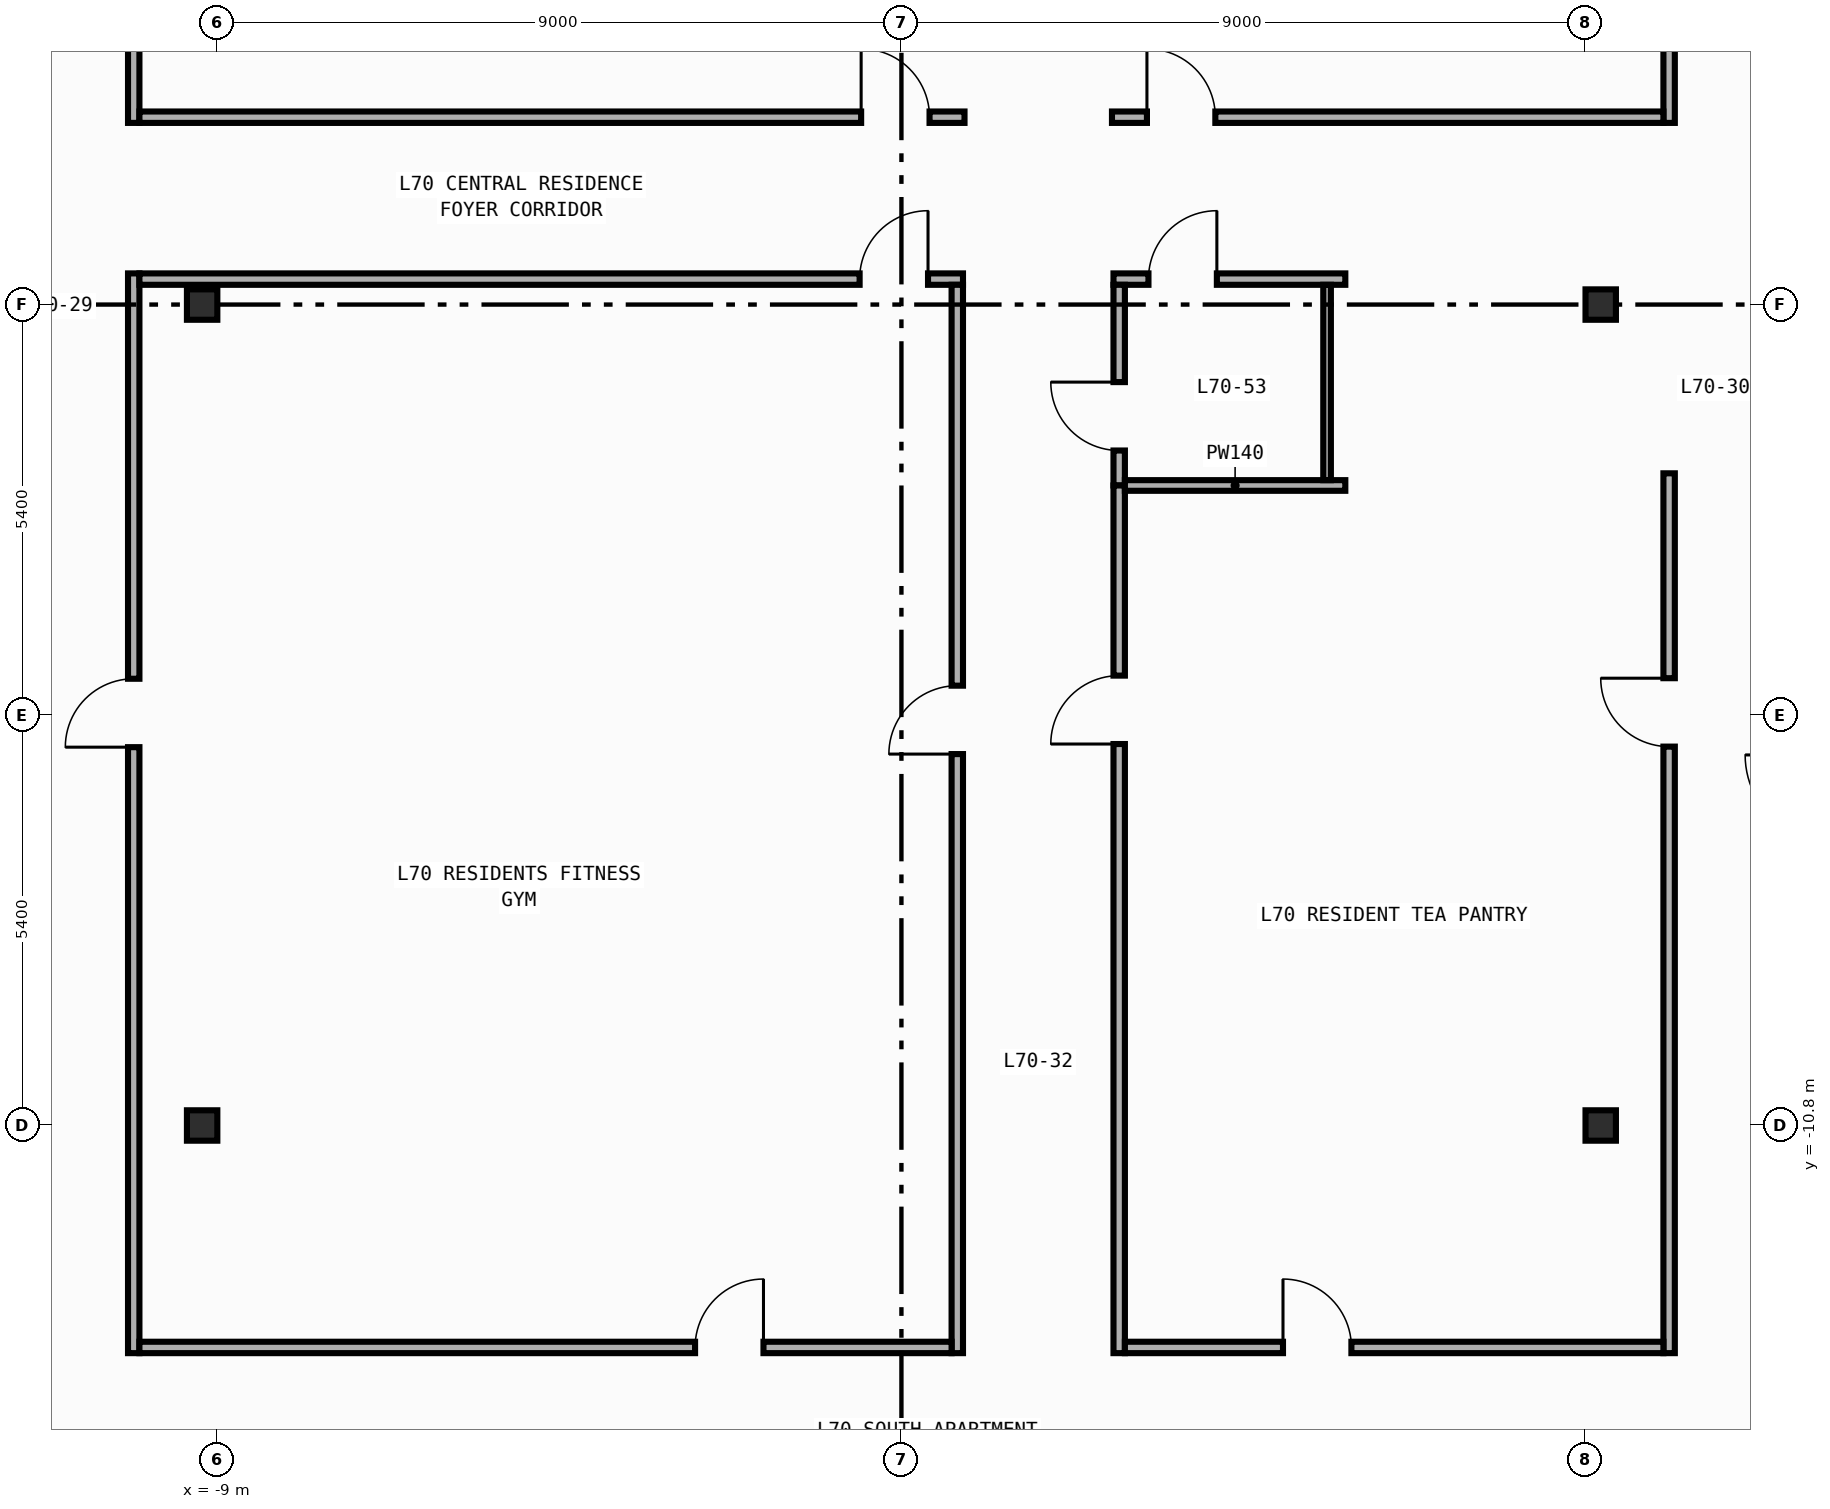
"""IFC4 building model, lengths in metres.
Left out: names, types, materials, properties, quantities, classifications, styles, units other than length and angle.
Written with IfcOpenShell. Run it as: python <this file> out.ifc"""

import sys

from ifc_helpers import new_model, si_unit, direction, frame, frame_2d, origin, origin_2d, place, context, subcontext, project, spatial, rectangle, i_section, extrude, element, fill, save


model = new_model("IFC4")
c1 = context("Model", 3, precision=1e-05, world=origin(), true_north=direction((0.0, 1.0)))
c2 = subcontext(c1, "Body", "Model", "MODEL_VIEW")
j1 = project(units=[si_unit("LENGTHUNIT", "METRE"), si_unit("PLANEANGLEUNIT", "RADIAN")], contexts=[c1])
p1 = place(None, origin())
s1 = spatial("IfcSite", under=j1, at=p1, CompositionType="ELEMENT")
p2 = place(p1, origin())
s2 = spatial("IfcBuilding", under=s1, at=p2, CompositionType="ELEMENT")
p3 = place(p2, frame((0.0, 0.0, 292.8)))
s3 = spatial("IfcBuildingStorey", under=s2, at=p3, CompositionType="ELEMENT", Elevation=292.8)
for number, where, z_axis, x_axis in (
    (1, (-9.2, -10.8, 0.0), (0.0, 0.0, 1.0), (1.0, 0.0, 0.0)),
    (2, (-9.2, 0.0, 0.0), (0.0, 0.0, 1.0), (1.0, 0.0, 0.0)),
    (3, (9.2, -10.8, 0.0), (0.0, 0.0, 1.0), (1.0, 0.0, 0.0)),
    (4, (9.2, 0.0, 0.0), (0.0, 0.0, 1.0), (1.0, 0.0, 0.0)),
):
    element("IfcColumn", number, at=place(p3, frame(where, z_axis=z_axis, x_axis=x_axis)), inside=s3, PredefinedType="COLUMN", context=c2, shape_type="SweptSolid", body=[
        extrude(i_section(OverallWidth=0.4, OverallDepth=0.4, WebThickness=0.013, FlangeThickness=0.021, FilletRadius=0.022, at=origin_2d()), origin(), (0.0, 0.0, 1.0), 3.8),
    ])
p4 = place(p3, frame((-10.1, 2.39, 0.0), z_axis=(0.0, 0.0, 1.0), x_axis=(0.0, 1.0, 0.0)))
e5 = element("IfcWall", 5, at=p4, inside=s3, PredefinedType="PARTITIONING", context=c2, shape_type="SweptSolid", body=[
    extrude(rectangle(XDim=11.405, YDim=0.15, at=frame_2d((5.703, 0.0))), origin(), (0.0, 0.0, 1.0), 3.54),
])
p5 = place(p4, frame((2.5, 0.0, 0.0)))
e6 = element("IfcOpeningElement", 6, at=p5, cuts=e5, PredefinedType="OPENING", context=c2, shape_type="SweptSolid", body=[
    extrude(rectangle(XDim=0.9, YDim=2.15, at=frame_2d((0.45, 1.075))), frame((0.0, 0.085, 0.0), z_axis=(0.0, -1.0, 0.0), x_axis=(1.0, 0.0, 0.0)), (0.0, 0.0, 1.0), 0.17),
])
p6 = place(p3, frame((-10.1, -13.795, 0.0), z_axis=(0.0, 0.0, 1.0), x_axis=(0.0, 1.0, 0.0)))
e7 = element("IfcWall", 7, at=p6, inside=s3, PredefinedType="PARTITIONING", context=c2, shape_type="SweptSolid", body=[
    extrude(rectangle(XDim=14.205, YDim=0.15, at=frame_2d((7.103, 0.0))), origin(), (0.0, 0.0, 1.0), 3.54),
])
p7 = place(p6, frame((7.972, 0.0, 0.0)))
e8 = element("IfcOpeningElement", 8, at=p7, cuts=e7, PredefinedType="OPENING", context=c2, shape_type="SweptSolid", body=[
    extrude(rectangle(XDim=0.9, YDim=2.15, at=frame_2d((0.45, 1.075))), frame((0.0, 0.085, 0.0), z_axis=(0.0, -1.0, 0.0), x_axis=(1.0, 0.0, 0.0)), (0.0, 0.0, 1.0), 0.17),
])
p8 = place(p3, frame((10.1, 2.39, 0.0), z_axis=(0.0, 0.0, 1.0), x_axis=(0.0, 1.0, 0.0)))
e9 = element("IfcWall", 9, at=p8, inside=s3, PredefinedType="PARTITIONING", context=c2, shape_type="SweptSolid", body=[
    extrude(rectangle(XDim=11.49, YDim=0.15, at=frame_2d((5.745, 0.0))), origin(), (0.0, 0.0, 1.0), 3.54),
])
p9 = place(p8, frame((2.475, 0.0, 0.0)))
e10 = element("IfcOpeningElement", 10, at=p9, cuts=e9, PredefinedType="OPENING", context=c2, shape_type="SweptSolid", body=[
    extrude(rectangle(XDim=0.9, YDim=2.15, at=frame_2d((0.45, 1.075))), frame((0.0, 0.085, 0.0), z_axis=(0.0, -1.0, 0.0), x_axis=(1.0, 0.0, 0.0)), (0.0, 0.0, 1.0), 0.17),
])
p10 = place(p3, frame((10.1, -13.795, 0.0), z_axis=(0.0, 0.0, 1.0), x_axis=(0.0, 1.0, 0.0)))
e11 = element("IfcWall", 11, at=p10, inside=s3, PredefinedType="PARTITIONING", context=c2, shape_type="SweptSolid", body=[
    extrude(rectangle(XDim=11.575, YDim=0.15, at=frame_2d((5.788, 0.0))), origin(), (0.0, 0.0, 1.0), 3.54),
])
p11 = place(p10, frame((7.979, 0.0, 0.0)))
e12 = element("IfcOpeningElement", 12, at=p11, cuts=e11, PredefinedType="OPENING", context=c2, shape_type="SweptSolid", body=[
    extrude(rectangle(XDim=0.9, YDim=2.15, at=frame_2d((0.45, 1.075))), frame((0.0, 0.085, 0.0), z_axis=(0.0, -1.0, 0.0), x_axis=(1.0, 0.0, 0.0)), (0.0, 0.0, 1.0), 0.17),
])
p12 = place(p3, frame((-10.025, 2.465, 0.0), z_axis=(0.0, 0.0, 1.0), x_axis=(1.0, 0.0, 0.0)))
e13 = element("IfcWall", 13, at=p12, inside=s3, PredefinedType="PARTITIONING", context=c2, shape_type="SweptSolid", body=[
    extrude(rectangle(XDim=10.855, YDim=0.15, at=frame_2d((5.427, 0.0))), origin(), (0.0, 0.0, 1.0), 3.54),
])
p13 = place(p12, frame((9.495, 0.0, 0.0)))
e14 = element("IfcOpeningElement", 14, at=p13, cuts=e13, PredefinedType="OPENING", context=c2, shape_type="SweptSolid", body=[
    extrude(rectangle(XDim=0.9, YDim=2.15, at=frame_2d((0.45, 1.075))), frame((0.0, 0.085, 0.0), z_axis=(0.0, -1.0, 0.0), x_axis=(1.0, 0.0, 0.0)), (0.0, 0.0, 1.0), 0.17),
])
p14 = place(p3, frame((-10.025, 0.335, 0.0), z_axis=(0.0, 0.0, 1.0), x_axis=(1.0, 0.0, 0.0)))
e15 = element("IfcWall", 15, at=p14, inside=s3, PredefinedType="PARTITIONING", context=c2, shape_type="SweptSolid", body=[
    extrude(rectangle(XDim=10.835, YDim=0.15, at=frame_2d((5.417, 0.0))), origin(), (0.0, 0.0, 1.0), 2.64),
])
p15 = place(p14, frame((9.475, 0.0, 0.0)))
e16 = element("IfcOpeningElement", 16, at=p15, cuts=e15, PredefinedType="OPENING", context=c2, shape_type="SweptSolid", body=[
    extrude(rectangle(XDim=0.9, YDim=2.15, at=frame_2d((0.45, 1.075))), frame((0.0, 0.085, 0.0), z_axis=(0.0, -1.0, 0.0), x_axis=(1.0, 0.0, 0.0)), (0.0, 0.0, 1.0), 0.17),
])
p16 = place(p3, frame((2.77, 2.465, 0.0), z_axis=(0.0, 0.0, 1.0), x_axis=(1.0, 0.0, 0.0)))
e17 = element("IfcWall", 17, at=p16, inside=s3, PredefinedType="PARTITIONING", context=c2, shape_type="SweptSolid", body=[
    extrude(rectangle(XDim=7.255, YDim=0.15, at=frame_2d((3.627, 0.0))), origin(), (0.0, 0.0, 1.0), 3.54),
])
p17 = place(p16, frame((0.46, 0.0, 0.0)))
e18 = element("IfcOpeningElement", 18, at=p17, cuts=e17, PredefinedType="OPENING", context=c2, shape_type="SweptSolid", body=[
    extrude(rectangle(XDim=0.9, YDim=2.15, at=frame_2d((0.45, 1.075))), frame((0.0, 0.085, 0.0), z_axis=(0.0, -1.0, 0.0), x_axis=(1.0, 0.0, 0.0)), (0.0, 0.0, 1.0), 0.17),
])
p18 = place(p3, frame((2.79, 0.335, 0.0), z_axis=(0.0, 0.0, 1.0), x_axis=(1.0, 0.0, 0.0)))
e19 = element("IfcWall", 19, at=p18, inside=s3, PredefinedType="PARTITIONING", context=c2, shape_type="SweptSolid", body=[
    extrude(rectangle(XDim=3.05, YDim=0.15, at=frame_2d((1.525, 0.0))), origin(), (0.0, 0.0, 1.0), 2.64),
])
p19 = place(p18, frame((0.46, 0.0, 0.0)))
e20 = element("IfcOpeningElement", 20, at=p19, cuts=e19, PredefinedType="OPENING", context=c2, shape_type="SweptSolid", body=[
    extrude(rectangle(XDim=0.9, YDim=2.15, at=frame_2d((0.45, 1.075))), frame((0.0, 0.085, 0.0), z_axis=(0.0, -1.0, 0.0), x_axis=(1.0, 0.0, 0.0)), (0.0, 0.0, 1.0), 0.17),
])
p20 = place(p3, frame((0.735, -13.795, 0.0), z_axis=(0.0, 0.0, 1.0), x_axis=(0.0, 1.0, 0.0)))
e21 = element("IfcWall", 21, at=p20, inside=s3, PredefinedType="PARTITIONING", context=c2, shape_type="SweptSolid", body=[
    extrude(rectangle(XDim=14.055, YDim=0.15, at=frame_2d((7.027, 0.0))), origin(), (0.0, 0.0, 1.0), 3.54),
])
p21 = place(p20, frame((7.881, 0.0, 0.0)))
e22 = element("IfcOpeningElement", 22, at=p21, cuts=e21, PredefinedType="OPENING", context=c2, shape_type="SweptSolid", body=[
    extrude(rectangle(XDim=0.9, YDim=2.15, at=frame_2d((0.45, 1.075))), frame((0.0, 0.085, 0.0), z_axis=(0.0, -1.0, 0.0), x_axis=(1.0, 0.0, 0.0)), (0.0, 0.0, 1.0), 0.17),
])
p22 = place(p3, frame((2.865, -2.38, 0.0), z_axis=(0.0, 0.0, 1.0), x_axis=(0.0, 1.0, 0.0)))
e23 = element("IfcWall", 23, at=p22, inside=s3, PredefinedType="PARTITIONING", context=c2, shape_type="SweptSolid", body=[
    extrude(rectangle(XDim=2.64, YDim=0.15, at=frame_2d((1.32, 0.0))), origin(), (0.0, 0.0, 1.0), 3.54),
])
p23 = place(p22, frame((0.46, 0.0, 0.0)))
e24 = element("IfcOpeningElement", 24, at=p23, cuts=e23, PredefinedType="OPENING", context=c2, shape_type="SweptSolid", body=[
    extrude(rectangle(XDim=0.9, YDim=2.15, at=frame_2d((0.45, 1.075))), frame((0.0, 0.085, 0.0), z_axis=(0.0, -1.0, 0.0), x_axis=(1.0, 0.0, 0.0)), (0.0, 0.0, 1.0), 0.17),
])
p24 = place(p3, frame((2.865, -13.795, 0.0), z_axis=(0.0, 0.0, 1.0), x_axis=(0.0, 1.0, 0.0)))
e25 = element("IfcWall", 25, at=p24, inside=s3, PredefinedType="PARTITIONING", context=c2, shape_type="SweptSolid", body=[
    extrude(rectangle(XDim=11.415, YDim=0.15, at=frame_2d((5.708, 0.0))), origin(), (0.0, 0.0, 1.0), 3.54),
])
p25 = place(p24, frame((8.013, 0.0, 0.0)))
e26 = element("IfcOpeningElement", 26, at=p25, cuts=e25, PredefinedType="OPENING", context=c2, shape_type="SweptSolid", body=[
    extrude(rectangle(XDim=0.9, YDim=2.15, at=frame_2d((0.45, 1.075))), frame((0.0, 0.085, 0.0), z_axis=(0.0, -1.0, 0.0), x_axis=(1.0, 0.0, 0.0)), (0.0, 0.0, 1.0), 0.17),
])
p26 = place(p3, frame((-10.025, -13.72, 0.0), z_axis=(0.0, 0.0, 1.0), x_axis=(1.0, 0.0, 0.0)))
e27 = element("IfcWall", 27, at=p26, inside=s3, PredefinedType="PARTITIONING", context=c2, shape_type="SweptSolid", body=[
    extrude(rectangle(XDim=10.685, YDim=0.15, at=frame_2d((5.342, 0.0))), origin(), (0.0, 0.0, 1.0), 3.54),
])
p27 = place(p26, frame((7.31, 0.0, 0.0)))
e28 = element("IfcOpeningElement", 28, at=p27, cuts=e27, PredefinedType="OPENING", context=c2, shape_type="SweptSolid", body=[
    extrude(rectangle(XDim=0.9, YDim=2.15, at=frame_2d((0.45, 1.075))), frame((0.0, 0.085, 0.0), z_axis=(0.0, -1.0, 0.0), x_axis=(1.0, 0.0, 0.0)), (0.0, 0.0, 1.0), 0.17),
])
p28 = place(p3, frame((2.94, -13.72, 0.0), z_axis=(0.0, 0.0, 1.0), x_axis=(1.0, 0.0, 0.0)))
e29 = element("IfcWall", 29, at=p28, inside=s3, PredefinedType="PARTITIONING", context=c2, shape_type="SweptSolid", body=[
    extrude(rectangle(XDim=7.085, YDim=0.15, at=frame_2d((3.542, 0.0))), origin(), (0.0, 0.0, 1.0), 3.54),
])
p29 = place(p28, frame((2.08, 0.0, 0.0)))
e30 = element("IfcOpeningElement", 30, at=p29, cuts=e29, PredefinedType="OPENING", context=c2, shape_type="SweptSolid", body=[
    extrude(rectangle(XDim=0.9, YDim=2.15, at=frame_2d((0.45, 1.075))), frame((0.0, 0.085, 0.0), z_axis=(0.0, -1.0, 0.0), x_axis=(1.0, 0.0, 0.0)), (0.0, 0.0, 1.0), 0.17),
])
p30 = place(p3, frame((2.94, -2.38, 0.0), z_axis=(0.0, 0.0, 1.0), x_axis=(1.0, 0.0, 0.0)))
e31 = element("IfcWall", 31, at=p30, inside=s3, PredefinedType="PARTITIONING", context=c2, shape_type="SweptSolid", body=[
    extrude(rectangle(XDim=2.9, YDim=0.14, at=frame_2d((1.45, 0.0))), origin(), (0.0, 0.0, 1.0), 3.54),
])
p31 = place(p3, frame((5.6, 0.26, 0.0), z_axis=(0.0, 0.0, 1.0), x_axis=(0.0, -1.0, 0.0)))
e32 = element("IfcWall", 32, at=p31, inside=s3, PredefinedType="PARTITIONING", context=c2, shape_type="SweptSolid", body=[
    extrude(rectangle(XDim=2.57, YDim=0.1, at=frame_2d((1.285, 0.0))), origin(), (0.0, 0.0, 1.0), 3.54),
])
p32 = place(p7, origin())
e33 = element("IfcDoor", 33, at=p32, inside=s3, OperationType="SINGLE_SWING_LEFT", PredefinedType="DOOR", context=c2, shape_type="SweptSolid", body=[
    extrude(rectangle(XDim=0.9, YDim=2.15, at=frame_2d((0.45, 1.075))), frame((0.0, 0.025, 0.0), z_axis=(0.0, -1.0, 0.0), x_axis=(1.0, 0.0, 0.0)), (0.0, 0.0, 1.0), 0.05),
])
fill(e8, e33)
p33 = place(p11, origin())
e34 = element("IfcDoor", 34, at=p33, inside=s3, OperationType="SINGLE_SWING_RIGHT", PredefinedType="DOOR", context=c2, shape_type="SweptSolid", body=[
    extrude(rectangle(XDim=0.9, YDim=2.15, at=frame_2d((0.45, 1.075))), frame((0.0, 0.025, 0.0), z_axis=(0.0, -1.0, 0.0), x_axis=(1.0, 0.0, 0.0)), (0.0, 0.0, 1.0), 0.05),
])
fill(e12, e34)
p34 = place(p13, origin())
e35 = element("IfcDoor", 35, at=p34, inside=s3, OperationType="SINGLE_SWING_LEFT", PredefinedType="DOOR", context=c2, shape_type="SweptSolid", body=[
    extrude(rectangle(XDim=0.9, YDim=2.15, at=frame_2d((0.45, 1.075))), frame((0.0, 0.025, 0.0), z_axis=(0.0, -1.0, 0.0), x_axis=(1.0, 0.0, 0.0)), (0.0, 0.0, 1.0), 0.05),
])
fill(e14, e35)
p35 = place(p15, origin())
e36 = element("IfcDoor", 36, at=p35, inside=s3, OperationType="SINGLE_SWING_RIGHT", PredefinedType="DOOR", context=c2, shape_type="SweptSolid", body=[
    extrude(rectangle(XDim=0.9, YDim=2.15, at=frame_2d((0.45, 1.075))), frame((0.0, 0.025, 0.0), z_axis=(0.0, -1.0, 0.0), x_axis=(1.0, 0.0, 0.0)), (0.0, 0.0, 1.0), 0.05),
])
fill(e16, e36)
p36 = place(p17, origin())
e37 = element("IfcDoor", 37, at=p36, inside=s3, OperationType="SINGLE_SWING_LEFT", PredefinedType="DOOR", context=c2, shape_type="SweptSolid", body=[
    extrude(rectangle(XDim=0.9, YDim=2.15, at=frame_2d((0.45, 1.075))), frame((0.0, 0.025, 0.0), z_axis=(0.0, -1.0, 0.0), x_axis=(1.0, 0.0, 0.0)), (0.0, 0.0, 1.0), 0.05),
])
fill(e18, e37)
p37 = place(p19, origin())
e38 = element("IfcDoor", 38, at=p37, inside=s3, OperationType="SINGLE_SWING_RIGHT", PredefinedType="DOOR", context=c2, shape_type="SweptSolid", body=[
    extrude(rectangle(XDim=0.9, YDim=2.15, at=frame_2d((0.45, 1.075))), frame((0.0, 0.025, 0.0), z_axis=(0.0, -1.0, 0.0), x_axis=(1.0, 0.0, 0.0)), (0.0, 0.0, 1.0), 0.05),
])
fill(e20, e38)
p38 = place(p21, origin())
e39 = element("IfcDoor", 39, at=p38, inside=s3, OperationType="SINGLE_SWING_LEFT", PredefinedType="DOOR", context=c2, shape_type="SweptSolid", body=[
    extrude(rectangle(XDim=0.9, YDim=2.15, at=frame_2d((0.45, 1.075))), frame((0.0, 0.025, 0.0), z_axis=(0.0, -1.0, 0.0), x_axis=(1.0, 0.0, 0.0)), (0.0, 0.0, 1.0), 0.05),
])
fill(e22, e39)
p39 = place(p23, origin())
e40 = element("IfcDoor", 40, at=p39, inside=s3, OperationType="SINGLE_SWING_RIGHT", PredefinedType="DOOR", context=c2, shape_type="SweptSolid", body=[
    extrude(rectangle(XDim=0.9, YDim=2.15, at=frame_2d((0.45, 1.075))), frame((0.0, 0.025, 0.0), z_axis=(0.0, -1.0, 0.0), x_axis=(1.0, 0.0, 0.0)), (0.0, 0.0, 1.0), 0.05),
])
fill(e24, e40)
p40 = place(p25, origin())
e41 = element("IfcDoor", 41, at=p40, inside=s3, OperationType="SINGLE_SWING_LEFT", PredefinedType="DOOR", context=c2, shape_type="SweptSolid", body=[
    extrude(rectangle(XDim=0.9, YDim=2.15, at=frame_2d((0.45, 1.075))), frame((0.0, 0.025, 0.0), z_axis=(0.0, -1.0, 0.0), x_axis=(1.0, 0.0, 0.0)), (0.0, 0.0, 1.0), 0.05),
])
fill(e26, e41)
p41 = place(p27, origin())
e42 = element("IfcDoor", 42, at=p41, inside=s3, OperationType="SINGLE_SWING_RIGHT", PredefinedType="DOOR", context=c2, shape_type="SweptSolid", body=[
    extrude(rectangle(XDim=0.9, YDim=2.15, at=frame_2d((0.45, 1.075))), frame((0.0, 0.025, 0.0), z_axis=(0.0, -1.0, 0.0), x_axis=(1.0, 0.0, 0.0)), (0.0, 0.0, 1.0), 0.05),
])
fill(e28, e42)
p42 = place(p29, origin())
e43 = element("IfcDoor", 43, at=p42, inside=s3, OperationType="SINGLE_SWING_LEFT", PredefinedType="DOOR", context=c2, shape_type="SweptSolid", body=[
    extrude(rectangle(XDim=0.9, YDim=2.15, at=frame_2d((0.45, 1.075))), frame((0.0, 0.025, 0.0), z_axis=(0.0, -1.0, 0.0), x_axis=(1.0, 0.0, 0.0)), (0.0, 0.0, 1.0), 0.05),
])
fill(e30, e43)
save(model, sys.argv[1])
